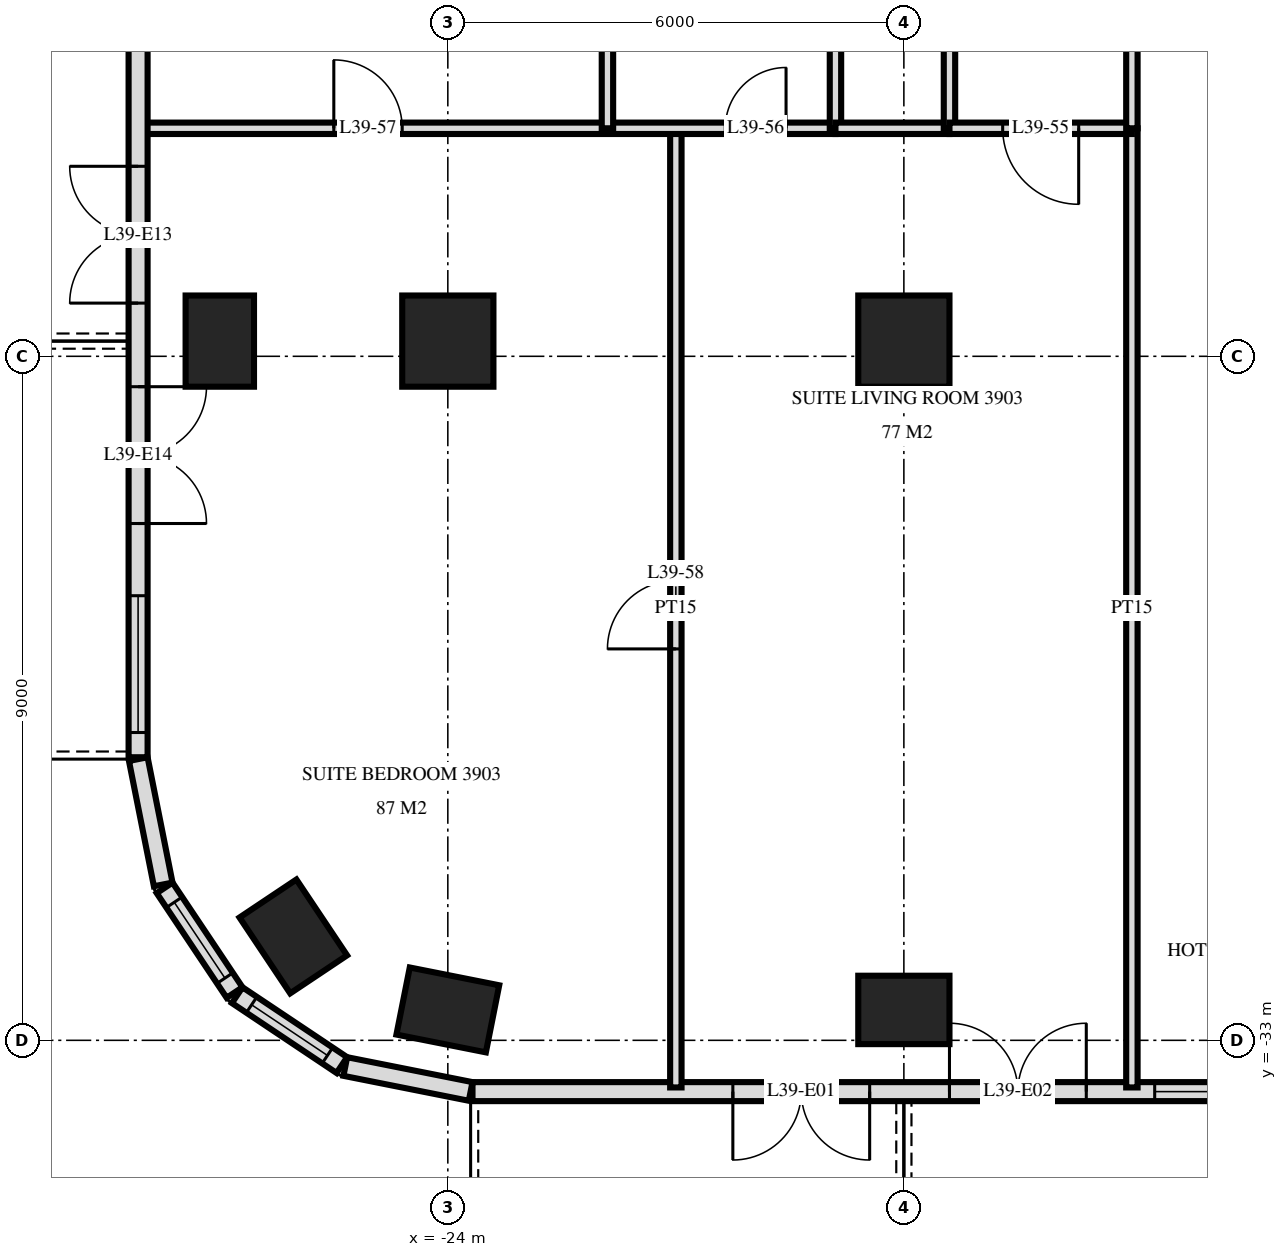
"""IFC4 building model, lengths in metres.
Left out: names, types, materials, properties, quantities, classifications, styles, units other than length and angle.
Written with IfcOpenShell. Run it as: python <this file> out.ifc"""

import sys

from ifc_helpers import new_model, si_unit, direction, frame, frame_2d, origin, origin_2d, place, context, subcontext, project, spatial, rectangle, extrude, element, fill, save


model = new_model("IFC4")
c1 = context("Model", 3, precision=1e-05, world=origin(), true_north=direction((0.0, 1.0)))
c2 = subcontext(c1, "Body", "Model", "MODEL_VIEW")
j1 = project(units=[si_unit("LENGTHUNIT", "METRE"), si_unit("PLANEANGLEUNIT", "RADIAN")], contexts=[c1])
p1 = place(None, origin())
s1 = spatial("IfcSite", under=j1, at=p1, CompositionType="ELEMENT")
p2 = place(p1, origin())
s2 = spatial("IfcBuilding", under=s1, at=p2, CompositionType="ELEMENT")
p3 = place(p2, frame((0.0, 0.0, 152.4)))
s3 = spatial("IfcBuildingStorey", under=s2, at=p3, CompositionType="ELEMENT", Elevation=152.4)
for number, where, z_axis, x_axis in (
    (1, (-27.0, -23.8, 0.0), (0.0, 0.0, 1.0), (0.0, 1.0, 0.0)),
    (2, (-26.033, -31.633, 0.0), (0.0, 0.0, 1.0), (-0.556, 0.831, 0.0)),
    (3, (-24.0, -32.6, 0.0), (0.0, 0.0, 1.0), (-0.981, 0.195, 0.0)),
):
    element("IfcColumn", number, at=place(p3, frame(where, z_axis=z_axis, x_axis=x_axis)), inside=s3, PredefinedType="COLUMN", context=c2, shape_type="SweptSolid", body=[
        extrude(rectangle(XDim=1.2, YDim=0.9, at=origin_2d()), origin(), (0.0, 0.0, 1.0), 3.6),
    ])
p4 = place(p3, frame((-24.0, -23.8, 0.0), z_axis=(0.0, 0.0, 1.0), x_axis=(1.0, 0.0, 0.0)))
e4 = element("IfcColumn", 4, at=p4, inside=s3, PredefinedType="COLUMN", context=c2, shape_type="SweptSolid", body=[
    extrude(rectangle(XDim=1.2, YDim=1.2, at=origin_2d()), origin(), (0.0, 0.0, 1.0), 3.6),
])
p5 = place(p3, frame((-18.0, -32.6, 0.0), z_axis=(0.0, 0.0, 1.0), x_axis=(1.0, 0.0, 0.0)))
e5 = element("IfcColumn", 5, at=p5, inside=s3, PredefinedType="COLUMN", context=c2, shape_type="SweptSolid", body=[
    extrude(rectangle(XDim=1.2, YDim=0.9, at=origin_2d()), origin(), (0.0, 0.0, 1.0), 3.6),
])
p6 = place(p3, frame((-18.0, -23.8, 0.0), z_axis=(0.0, 0.0, 1.0), x_axis=(1.0, 0.0, 0.0)))
e6 = element("IfcColumn", 6, at=p6, inside=s3, PredefinedType="COLUMN", context=c2, shape_type="SweptSolid", body=[
    extrude(rectangle(XDim=1.2, YDim=1.2, at=origin_2d()), origin(), (0.0, 0.0, 1.0), 3.6),
])
p7 = place(p3, frame((-28.075, -3.325, 0.0), z_axis=(0.0, 0.0, 1.0), x_axis=(0.0, -1.0, 0.0)))
e7 = element("IfcWall", 7, at=p7, inside=s3, PredefinedType="SOLIDWALL", context=c2, shape_type="SweptSolid", body=[
    extrude(rectangle(XDim=25.951, YDim=0.25, at=frame_2d((12.975, 0.0))), origin(), (0.0, 0.0, 1.0), 3.32),
])
p8 = place(p7, frame((7.275, 0.0, 0.0)))
e8 = element("IfcOpeningElement", 8, at=p8, cuts=e7, PredefinedType="OPENING", context=c2, shape_type="SweptSolid", body=[
    extrude(rectangle(XDim=1.8, YDim=2.4, at=frame_2d((0.9, 1.2))), frame((0.0, 0.135, 0.0), z_axis=(0.0, -1.0, 0.0), x_axis=(1.0, 0.0, 0.0)), (0.0, 0.0, 1.0), 0.27),
])
p9 = place(p7, frame((18.175, 0.0, 0.0)))
e9 = element("IfcOpeningElement", 9, at=p9, cuts=e7, PredefinedType="OPENING", context=c2, shape_type="SweptSolid", body=[
    extrude(rectangle(XDim=1.8, YDim=2.4, at=frame_2d((0.9, 1.2))), frame((0.0, 0.135, 0.0), z_axis=(0.0, -1.0, 0.0), x_axis=(1.0, 0.0, 0.0)), (0.0, 0.0, 1.0), 0.27),
])
p10 = place(p7, frame((21.075, 0.0, 0.0)))
e10 = element("IfcOpeningElement", 10, at=p10, cuts=e7, PredefinedType="OPENING", context=c2, shape_type="SweptSolid", body=[
    extrude(rectangle(XDim=1.8, YDim=2.4, at=frame_2d((0.9, 1.2))), frame((0.0, 0.135, 0.0), z_axis=(0.0, -1.0, 0.0), x_axis=(1.0, 0.0, 0.0)), (0.0, 0.0, 1.0), 0.27),
])
p11 = place(p7, frame((23.825, 0.0, 0.3)))
e11 = element("IfcOpeningElement", 11, at=p11, cuts=e7, PredefinedType="OPENING", context=c2, shape_type="SweptSolid", body=[
    extrude(rectangle(XDim=1.8, YDim=2.1, at=frame_2d((0.9, 1.05))), frame((0.0, 0.135, 0.0), z_axis=(0.0, -1.0, 0.0), x_axis=(1.0, 0.0, 0.0)), (0.0, 0.0, 1.0), 0.27),
])
p12 = place(p3, frame((-28.073, -29.3, 0.0), z_axis=(0.0, 0.0, 1.0), x_axis=(0.194999110559, -0.980803419081, 0.0)))
e12 = element("IfcWall", 12, at=p12, inside=s3, PredefinedType="SOLIDWALL", context=c2, shape_type="SweptSolid", body=[
    extrude(rectangle(XDim=1.681, YDim=0.25, at=frame_2d((0.841, 0.0))), origin(), (0.0, 0.0, 1.0), 3.32),
])
p13 = place(p3, frame((-27.726, -30.994, 0.0), z_axis=(0.0, 0.0, 1.0), x_axis=(0.55555029066, -0.831482937015, 0.0)))
e13 = element("IfcWall", 13, at=p13, inside=s3, PredefinedType="SOLIDWALL", context=c2, shape_type="SweptSolid", body=[
    extrude(rectangle(XDim=1.656, YDim=0.25, at=frame_2d((0.828, 0.0))), origin(), (0.0, 0.0, 1.0), 3.32),
])
p14 = place(p13, frame((0.228, 0.0, 0.9)))
e14 = element("IfcOpeningElement", 14, at=p14, cuts=e13, PredefinedType="OPENING", context=c2, shape_type="SweptSolid", body=[
    extrude(rectangle(XDim=1.2, YDim=1.5, at=frame_2d((0.6, 0.75))), frame((0.0, 0.135, 0.0), z_axis=(0.0, -1.0, 0.0), x_axis=(1.0, 0.0, 0.0)), (0.0, 0.0, 1.0), 0.27),
])
p15 = place(p3, frame((-26.771, -32.406, 0.0), z_axis=(0.0, 0.0, 1.0), x_axis=(0.831482937015, -0.55555029066, 0.0)))
e15 = element("IfcWall", 15, at=p15, inside=s3, PredefinedType="SOLIDWALL", context=c2, shape_type="SweptSolid", body=[
    extrude(rectangle(XDim=1.656, YDim=0.25, at=frame_2d((0.828, 0.0))), origin(), (0.0, 0.0, 1.0), 3.32),
])
p16 = place(p15, frame((0.228, 0.0, 0.9)))
e16 = element("IfcOpeningElement", 16, at=p16, cuts=e15, PredefinedType="OPENING", context=c2, shape_type="SweptSolid", body=[
    extrude(rectangle(XDim=1.2, YDim=1.5, at=frame_2d((0.6, 0.75))), frame((0.0, 0.135, 0.0), z_axis=(0.0, -1.0, 0.0), x_axis=(1.0, 0.0, 0.0)), (0.0, 0.0, 1.0), 0.27),
])
p17 = place(p3, frame((-25.349, -33.344, 0.0), z_axis=(0.0, 0.0, 1.0), x_axis=(0.980775640221, -0.19513878023, 0.0)))
e17 = element("IfcWall", 17, at=p17, inside=s3, PredefinedType="SOLIDWALL", context=c2, shape_type="SweptSolid", body=[
    extrude(rectangle(XDim=1.681, YDim=0.25, at=frame_2d((0.841, 0.0))), origin(), (0.0, 0.0, 1.0), 3.32),
])
p18 = place(p3, frame((-23.675, -33.675, 0.0), z_axis=(0.0, 0.0, 1.0), x_axis=(1.0, 0.0, 0.0)))
e18 = element("IfcWall", 18, at=p18, inside=s3, PredefinedType="SOLIDWALL", context=c2, shape_type="SweptSolid", body=[
    extrude(rectangle(XDim=47.351, YDim=0.25, at=frame_2d((23.675, 0.0))), origin(), (0.0, 0.0, 1.0), 3.32),
])
p19 = place(p18, frame((3.425, 0.0, 0.0)))
e19 = element("IfcOpeningElement", 19, at=p19, cuts=e18, PredefinedType="OPENING", context=c2, shape_type="SweptSolid", body=[
    extrude(rectangle(XDim=1.8, YDim=2.4, at=frame_2d((0.9, 1.2))), frame((0.0, 0.135, 0.0), z_axis=(0.0, -1.0, 0.0), x_axis=(1.0, 0.0, 0.0)), (0.0, 0.0, 1.0), 0.27),
])
p20 = place(p18, frame((6.275, 0.0, 0.0)))
e20 = element("IfcOpeningElement", 20, at=p20, cuts=e18, PredefinedType="OPENING", context=c2, shape_type="SweptSolid", body=[
    extrude(rectangle(XDim=1.8, YDim=2.4, at=frame_2d((0.9, 1.2))), frame((0.0, 0.135, 0.0), z_axis=(0.0, -1.0, 0.0), x_axis=(1.0, 0.0, 0.0)), (0.0, 0.0, 1.0), 0.27),
])
p21 = place(p18, frame((8.975, 0.0, 0.3)))
e21 = element("IfcOpeningElement", 21, at=p21, cuts=e18, PredefinedType="OPENING", context=c2, shape_type="SweptSolid", body=[
    extrude(rectangle(XDim=2.4, YDim=2.1, at=frame_2d((1.2, 1.05))), frame((0.0, 0.135, 0.0), z_axis=(0.0, -1.0, 0.0), x_axis=(1.0, 0.0, 0.0)), (0.0, 0.0, 1.0), 0.27),
])
p22 = place(p18, frame((12.275, 0.0, 0.0)))
e22 = element("IfcOpeningElement", 22, at=p22, cuts=e18, PredefinedType="OPENING", context=c2, shape_type="SweptSolid", body=[
    extrude(rectangle(XDim=1.8, YDim=2.4, at=frame_2d((0.9, 1.2))), frame((0.0, 0.135, 0.0), z_axis=(0.0, -1.0, 0.0), x_axis=(1.0, 0.0, 0.0)), (0.0, 0.0, 1.0), 0.27),
])
p23 = place(p18, frame((14.975, 0.0, 0.3)))
e23 = element("IfcOpeningElement", 23, at=p23, cuts=e18, PredefinedType="OPENING", context=c2, shape_type="SweptSolid", body=[
    extrude(rectangle(XDim=2.4, YDim=2.1, at=frame_2d((1.2, 1.05))), frame((0.0, 0.135, 0.0), z_axis=(0.0, -1.0, 0.0), x_axis=(1.0, 0.0, 0.0)), (0.0, 0.0, 1.0), 0.27),
])
p24 = place(p18, frame((21.275, 0.0, 0.0)))
e24 = element("IfcOpeningElement", 24, at=p24, cuts=e18, PredefinedType="OPENING", context=c2, shape_type="SweptSolid", body=[
    extrude(rectangle(XDim=1.8, YDim=2.4, at=frame_2d((0.9, 1.2))), frame((0.0, 0.135, 0.0), z_axis=(0.0, -1.0, 0.0), x_axis=(1.0, 0.0, 0.0)), (0.0, 0.0, 1.0), 0.27),
])
p25 = place(p18, frame((24.275, 0.0, 0.0)))
e25 = element("IfcOpeningElement", 25, at=p25, cuts=e18, PredefinedType="OPENING", context=c2, shape_type="SweptSolid", body=[
    extrude(rectangle(XDim=1.8, YDim=2.4, at=frame_2d((0.9, 1.2))), frame((0.0, 0.135, 0.0), z_axis=(0.0, -1.0, 0.0), x_axis=(1.0, 0.0, 0.0)), (0.0, 0.0, 1.0), 0.27),
])
p26 = place(p18, frame((30.275, 0.0, 0.0)))
e26 = element("IfcOpeningElement", 26, at=p26, cuts=e18, PredefinedType="OPENING", context=c2, shape_type="SweptSolid", body=[
    extrude(rectangle(XDim=1.8, YDim=2.4, at=frame_2d((0.9, 1.2))), frame((0.0, 0.135, 0.0), z_axis=(0.0, -1.0, 0.0), x_axis=(1.0, 0.0, 0.0)), (0.0, 0.0, 1.0), 0.27),
])
p27 = place(p18, frame((32.975, 0.0, 0.3)))
e27 = element("IfcOpeningElement", 27, at=p27, cuts=e18, PredefinedType="OPENING", context=c2, shape_type="SweptSolid", body=[
    extrude(rectangle(XDim=2.4, YDim=2.1, at=frame_2d((1.2, 1.05))), frame((0.0, 0.135, 0.0), z_axis=(0.0, -1.0, 0.0), x_axis=(1.0, 0.0, 0.0)), (0.0, 0.0, 1.0), 0.27),
])
p28 = place(p18, frame((36.275, 0.0, 0.0)))
e28 = element("IfcOpeningElement", 28, at=p28, cuts=e18, PredefinedType="OPENING", context=c2, shape_type="SweptSolid", body=[
    extrude(rectangle(XDim=1.8, YDim=2.4, at=frame_2d((0.9, 1.2))), frame((0.0, 0.135, 0.0), z_axis=(0.0, -1.0, 0.0), x_axis=(1.0, 0.0, 0.0)), (0.0, 0.0, 1.0), 0.27),
])
p29 = place(p18, frame((38.975, 0.0, 0.3)))
e29 = element("IfcOpeningElement", 29, at=p29, cuts=e18, PredefinedType="OPENING", context=c2, shape_type="SweptSolid", body=[
    extrude(rectangle(XDim=2.4, YDim=2.1, at=frame_2d((1.2, 1.05))), frame((0.0, 0.135, 0.0), z_axis=(0.0, -1.0, 0.0), x_axis=(1.0, 0.0, 0.0)), (0.0, 0.0, 1.0), 0.27),
])
p30 = place(p18, frame((42.275, 0.0, 0.0)))
e30 = element("IfcOpeningElement", 30, at=p30, cuts=e18, PredefinedType="OPENING", context=c2, shape_type="SweptSolid", body=[
    extrude(rectangle(XDim=1.8, YDim=2.4, at=frame_2d((0.9, 1.2))), frame((0.0, 0.135, 0.0), z_axis=(0.0, -1.0, 0.0), x_axis=(1.0, 0.0, 0.0)), (0.0, 0.0, 1.0), 0.27),
])
p31 = place(p18, frame((45.125, 0.0, 0.3)))
e31 = element("IfcOpeningElement", 31, at=p31, cuts=e18, PredefinedType="OPENING", context=c2, shape_type="SweptSolid", body=[
    extrude(rectangle(XDim=1.8, YDim=2.1, at=frame_2d((0.9, 1.05))), frame((0.0, 0.135, 0.0), z_axis=(0.0, -1.0, 0.0), x_axis=(1.0, 0.0, 0.0)), (0.0, 0.0, 1.0), 0.27),
])
p32 = place(p3, frame((-15.0, -21.0, 0.0), z_axis=(0.0, 0.0, 1.0), x_axis=(0.0, 1.0, 0.0)))
e32 = element("IfcWall", 32, at=p32, inside=s3, PredefinedType="PARTITIONING", context=c2, shape_type="SweptSolid", body=[
    extrude(rectangle(XDim=4.2, YDim=0.15, at=frame_2d((2.1, 0.0))), origin(), (0.0, 0.0, 1.0), 3.32),
])
p33 = place(p3, frame((-15.0, -33.62, 0.0), z_axis=(0.0, 0.0, 1.0), x_axis=(0.0, 1.0, 0.0)))
e33 = element("IfcWall", 33, at=p33, inside=s3, PredefinedType="PARTITIONING", context=c2, shape_type="SweptSolid", body=[
    extrude(rectangle(XDim=12.62, YDim=0.15, at=frame_2d((6.31, 0.0))), origin(), (0.0, 0.0, 1.0), 3.32),
])
p34 = place(p3, frame((-17.4, -21.0, 0.0), z_axis=(0.0, 0.0, 1.0), x_axis=(0.0, 1.0, 0.0)))
e34 = element("IfcWall", 34, at=p34, inside=s3, PredefinedType="PARTITIONING", context=c2, shape_type="SweptSolid", body=[
    extrude(rectangle(XDim=4.2, YDim=0.15, at=frame_2d((2.1, 0.0))), origin(), (0.0, 0.0, 1.0), 3.32),
])
p35 = place(p34, frame((1.6, 0.0, 0.0)))
e35 = element("IfcOpeningElement", 35, at=p35, cuts=e34, PredefinedType="OPENING", context=c2, shape_type="SweptSolid", body=[
    extrude(rectangle(XDim=1.0, YDim=2.1, at=frame_2d((0.5, 1.05))), frame((0.0, 0.085, 0.0), z_axis=(0.0, -1.0, 0.0), x_axis=(1.0, 0.0, 0.0)), (0.0, 0.0, 1.0), 0.17),
])
p36 = place(p3, frame((-18.9, -21.0, 0.0), z_axis=(0.0, 0.0, 1.0), x_axis=(0.0, 1.0, 0.0)))
e36 = element("IfcWall", 36, at=p36, inside=s3, PredefinedType="PLUMBINGWALL", context=c2, shape_type="SweptSolid", body=[
    extrude(rectangle(XDim=4.2, YDim=0.15, at=frame_2d((2.1, 0.0))), origin(), (0.0, 0.0, 1.0), 3.32),
])
p37 = place(p3, frame((-21.0, -33.62, 0.0), z_axis=(0.0, 0.0, 1.0), x_axis=(0.0, 1.0, 0.0)))
e37 = element("IfcWall", 37, at=p37, inside=s3, PredefinedType="PARTITIONING", context=c2, shape_type="SweptSolid", body=[
    extrude(rectangle(XDim=12.62, YDim=0.15, at=frame_2d((6.31, 0.0))), origin(), (0.0, 0.0, 1.0), 3.32),
])
p38 = place(p37, frame((5.77, 0.0, 0.0)))
e38 = element("IfcOpeningElement", 38, at=p38, cuts=e37, PredefinedType="OPENING", context=c2, shape_type="SweptSolid", body=[
    extrude(rectangle(XDim=0.9, YDim=2.1, at=frame_2d((0.45, 1.05))), frame((0.0, 0.085, 0.0), z_axis=(0.0, -1.0, 0.0), x_axis=(1.0, 0.0, 0.0)), (0.0, 0.0, 1.0), 0.17),
])
p39 = place(p3, frame((-21.9, -21.0, 0.0), z_axis=(0.0, 0.0, 1.0), x_axis=(0.0, 1.0, 0.0)))
e39 = element("IfcWall", 39, at=p39, inside=s3, PredefinedType="PARTITIONING", context=c2, shape_type="SweptSolid", body=[
    extrude(rectangle(XDim=4.2, YDim=0.15, at=frame_2d((2.1, 0.0))), origin(), (0.0, 0.0, 1.0), 3.32),
])
p40 = place(p3, frame((-17.4, -21.0, 0.0), z_axis=(0.0, 0.0, 1.0), x_axis=(1.0, 0.0, 0.0)))
e40 = element("IfcWall", 40, at=p40, inside=s3, PredefinedType="PARTITIONING", context=c2, shape_type="SweptSolid", body=[
    extrude(rectangle(XDim=2.4, YDim=0.15, at=frame_2d((1.2, 0.0))), origin(), (0.0, 0.0, 1.0), 3.32),
])
p41 = place(p40, frame((0.7, 0.0, 0.0)))
e41 = element("IfcOpeningElement", 41, at=p41, cuts=e40, PredefinedType="OPENING", context=c2, shape_type="SweptSolid", body=[
    extrude(rectangle(XDim=1.0, YDim=2.1, at=frame_2d((0.5, 1.05))), frame((0.0, 0.085, 0.0), z_axis=(0.0, -1.0, 0.0), x_axis=(1.0, 0.0, 0.0)), (0.0, 0.0, 1.0), 0.17),
])
p42 = place(p3, frame((-28.02, -21.0, 0.0), z_axis=(0.0, 0.0, 1.0), x_axis=(1.0, 0.0, 0.0)))
e42 = element("IfcWall", 42, at=p42, inside=s3, PredefinedType="PARTITIONING", context=c2, shape_type="SweptSolid", body=[
    extrude(rectangle(XDim=9.12, YDim=0.15, at=frame_2d((4.56, 0.0))), origin(), (0.0, 0.0, 1.0), 3.32),
])
p43 = place(p42, frame((7.67, 0.0, 0.0)))
e43 = element("IfcOpeningElement", 43, at=p43, cuts=e42, PredefinedType="OPENING", context=c2, shape_type="SweptSolid", body=[
    extrude(rectangle(XDim=0.8, YDim=2.1, at=frame_2d((0.4, 1.05))), frame((0.0, 0.085, 0.0), z_axis=(0.0, -1.0, 0.0), x_axis=(1.0, 0.0, 0.0)), (0.0, 0.0, 1.0), 0.17),
])
p44 = place(p42, frame((2.52, 0.0, 0.0)))
e44 = element("IfcOpeningElement", 44, at=p44, cuts=e42, PredefinedType="OPENING", context=c2, shape_type="SweptSolid", body=[
    extrude(rectangle(XDim=0.9, YDim=2.1, at=frame_2d((0.45, 1.05))), frame((0.0, 0.085, 0.0), z_axis=(0.0, -1.0, 0.0), x_axis=(1.0, 0.0, 0.0)), (0.0, 0.0, 1.0), 0.17),
])
p45 = place(p3, frame((-18.9, -21.0, 0.0), z_axis=(0.0, 0.0, 1.0), x_axis=(1.0, 0.0, 0.0)))
e45 = element("IfcWall", 45, at=p45, inside=s3, PredefinedType="PLUMBINGWALL", context=c2, shape_type="SweptSolid", body=[
    extrude(rectangle(XDim=1.5, YDim=0.15, at=frame_2d((0.75, 0.0))), origin(), (0.0, 0.0, 1.0), 3.32),
])
p46 = place(p14, origin())
e46 = element("IfcWindow", 46, at=p46, inside=s3, PartitioningType="SINGLE_PANEL", PredefinedType="WINDOW", context=c2, shape_type="SweptSolid", body=[
    extrude(rectangle(XDim=1.2, YDim=1.5, at=frame_2d((0.6, 0.75))), frame((0.0, 0.03, 0.0), z_axis=(0.0, -1.0, 0.0), x_axis=(1.0, 0.0, 0.0)), (0.0, 0.0, 1.0), 0.06),
])
fill(e14, e46)
p47 = place(p16, origin())
e47 = element("IfcWindow", 47, at=p47, inside=s3, PartitioningType="SINGLE_PANEL", PredefinedType="WINDOW", context=c2, shape_type="SweptSolid", body=[
    extrude(rectangle(XDim=1.2, YDim=1.5, at=frame_2d((0.6, 0.75))), frame((0.0, 0.03, 0.0), z_axis=(0.0, -1.0, 0.0), x_axis=(1.0, 0.0, 0.0)), (0.0, 0.0, 1.0), 0.06),
])
fill(e16, e47)
p48 = place(p19, frame((0.9, 0.0, 0.0), z_axis=(0.0, 0.0, 1.0), x_axis=(-1.0, 0.0, 0.0)))
e48 = element("IfcDoor", 48, at=p48, inside=s3, OperationType="DOUBLE_DOOR_SINGLE_SWING", PredefinedType="DOOR", context=c2, shape_type="SweptSolid", body=[
    extrude(rectangle(XDim=1.8, YDim=2.4, at=frame_2d((0.0, 1.2))), frame((0.0, -0.025, 0.0), z_axis=(0.0, 1.0, 0.0), x_axis=(-1.0, 0.0, 0.0)), (0.0, 0.0, 1.0), 0.05),
])
fill(e19, e48)
p49 = place(p20, origin())
e49 = element("IfcDoor", 49, at=p49, inside=s3, OperationType="DOUBLE_DOOR_SINGLE_SWING", PredefinedType="DOOR", context=c2, shape_type="SweptSolid", body=[
    extrude(rectangle(XDim=1.8, YDim=2.4, at=frame_2d((0.9, 1.2))), frame((0.0, 0.025, 0.0), z_axis=(0.0, -1.0, 0.0), x_axis=(1.0, 0.0, 0.0)), (0.0, 0.0, 1.0), 0.05),
])
fill(e20, e49)
p50 = place(p21, origin())
e50 = element("IfcWindow", 50, at=p50, inside=s3, PartitioningType="SINGLE_PANEL", PredefinedType="WINDOW", context=c2, shape_type="SweptSolid", body=[
    extrude(rectangle(XDim=2.4, YDim=2.1, at=frame_2d((1.2, 1.05))), frame((0.0, 0.03, 0.0), z_axis=(0.0, -1.0, 0.0), x_axis=(1.0, 0.0, 0.0)), (0.0, 0.0, 1.0), 0.06),
])
fill(e21, e50)
p51 = place(p9, frame((0.9, 0.0, 0.0), z_axis=(0.0, 0.0, 1.0), x_axis=(-1.0, 0.0, 0.0)))
e51 = element("IfcDoor", 51, at=p51, inside=s3, OperationType="DOUBLE_DOOR_SINGLE_SWING", PredefinedType="DOOR", context=c2, shape_type="SweptSolid", body=[
    extrude(rectangle(XDim=1.8, YDim=2.4, at=frame_2d((0.0, 1.2))), frame((0.0, -0.025, 0.0), z_axis=(0.0, 1.0, 0.0), x_axis=(-1.0, 0.0, 0.0)), (0.0, 0.0, 1.0), 0.05),
])
fill(e9, e51)
p52 = place(p10, origin())
e52 = element("IfcDoor", 52, at=p52, inside=s3, OperationType="DOUBLE_DOOR_SINGLE_SWING", PredefinedType="DOOR", context=c2, shape_type="SweptSolid", body=[
    extrude(rectangle(XDim=1.8, YDim=2.4, at=frame_2d((0.9, 1.2))), frame((0.0, 0.025, 0.0), z_axis=(0.0, -1.0, 0.0), x_axis=(1.0, 0.0, 0.0)), (0.0, 0.0, 1.0), 0.05),
])
fill(e10, e52)
p53 = place(p11, origin())
e53 = element("IfcWindow", 53, at=p53, inside=s3, PartitioningType="SINGLE_PANEL", PredefinedType="WINDOW", context=c2, shape_type="SweptSolid", body=[
    extrude(rectangle(XDim=1.8, YDim=2.1, at=frame_2d((0.9, 1.05))), frame((0.0, 0.03, 0.0), z_axis=(0.0, -1.0, 0.0), x_axis=(1.0, 0.0, 0.0)), (0.0, 0.0, 1.0), 0.06),
])
fill(e11, e53)
p54 = place(p41, frame((0.5, 0.0, 0.0), z_axis=(0.0, 0.0, 1.0), x_axis=(-1.0, 0.0, 0.0)))
e54 = element("IfcDoor", 54, at=p54, inside=s3, OperationType="SINGLE_SWING_RIGHT", PredefinedType="DOOR", context=c2, shape_type="SweptSolid", body=[
    extrude(rectangle(XDim=1.0, YDim=2.1, at=frame_2d((0.0, 1.05))), frame((0.0, -0.025, 0.0), z_axis=(0.0, 1.0, 0.0), x_axis=(-1.0, 0.0, 0.0)), (0.0, 0.0, 1.0), 0.05),
])
fill(e41, e54)
p55 = place(p43, origin())
e55 = element("IfcDoor", 55, at=p55, inside=s3, OperationType="SINGLE_SWING_LEFT", PredefinedType="DOOR", context=c2, shape_type="SweptSolid", body=[
    extrude(rectangle(XDim=0.8, YDim=2.1, at=frame_2d((0.4, 1.05))), frame((0.0, 0.025, 0.0), z_axis=(0.0, -1.0, 0.0), x_axis=(1.0, 0.0, 0.0)), (0.0, 0.0, 1.0), 0.05),
])
fill(e43, e55)
p56 = place(p44, origin())
e56 = element("IfcDoor", 56, at=p56, inside=s3, OperationType="SINGLE_SWING_RIGHT", PredefinedType="DOOR", context=c2, shape_type="SweptSolid", body=[
    extrude(rectangle(XDim=0.9, YDim=2.1, at=frame_2d((0.45, 1.05))), frame((0.0, 0.025, 0.0), z_axis=(0.0, -1.0, 0.0), x_axis=(1.0, 0.0, 0.0)), (0.0, 0.0, 1.0), 0.05),
])
fill(e44, e56)
p57 = place(p38, origin())
e57 = element("IfcDoor", 57, at=p57, inside=s3, OperationType="SINGLE_SWING_RIGHT", PredefinedType="DOOR", context=c2, shape_type="SweptSolid", body=[
    extrude(rectangle(XDim=0.9, YDim=2.1, at=frame_2d((0.45, 1.05))), frame((0.0, 0.025, 0.0), z_axis=(0.0, -1.0, 0.0), x_axis=(1.0, 0.0, 0.0)), (0.0, 0.0, 1.0), 0.05),
])
fill(e38, e57)
save(model, sys.argv[1])
